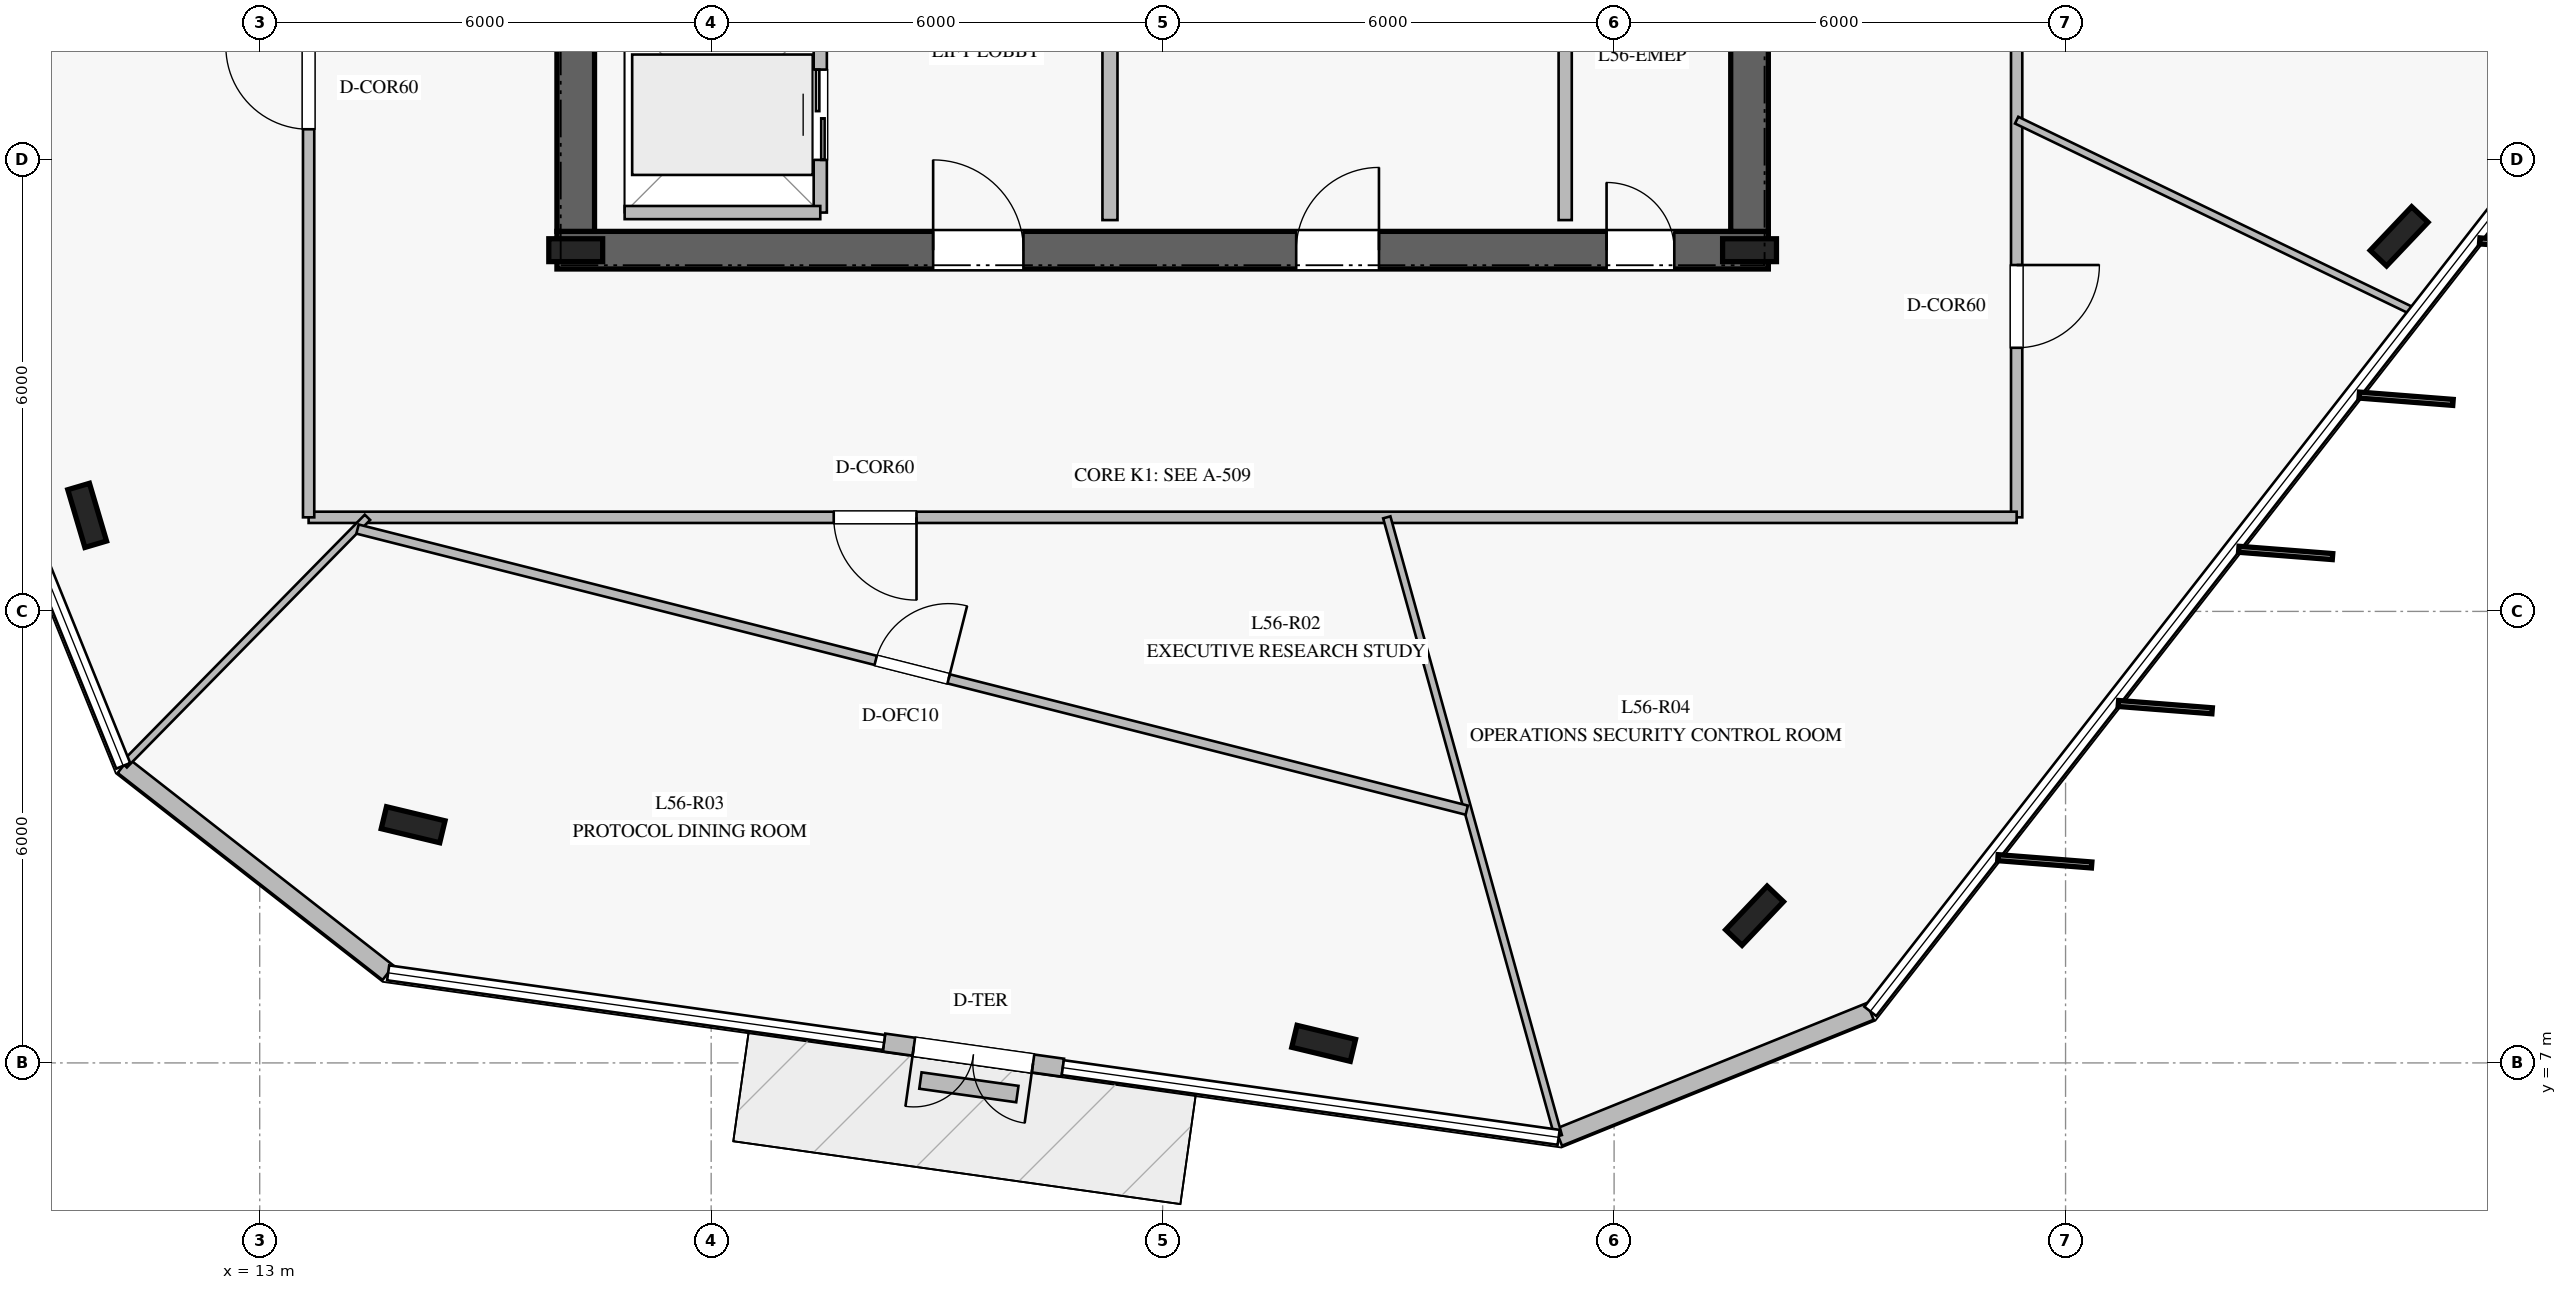
"""IFC4 building model, lengths in metres.
Left out: names, types, materials, properties, quantities, classifications, styles, units other than length and angle.
Written with IfcOpenShell. Run it as: python <this file> out.ifc"""

import sys

from ifc_helpers import new_model, si_unit, direction, frame, frame_2d, origin, origin_2d, place, context, subcontext, project, spatial, rectangle, i_section, extrude, element, fill, save


model = new_model("IFC4")
c1 = context("Model", 3, precision=1e-05, world=origin(), true_north=direction((0.0, 1.0)))
c2 = subcontext(c1, "Body", "Model", "MODEL_VIEW")
j1 = project(units=[si_unit("LENGTHUNIT", "METRE"), si_unit("PLANEANGLEUNIT", "RADIAN")], contexts=[c1])
p1 = place(None, origin())
s1 = spatial("IfcSite", under=j1, at=p1, CompositionType="ELEMENT")
p2 = place(p1, origin())
s2 = spatial("IfcBuilding", under=s1, at=p2, CompositionType="ELEMENT")
p3 = place(p2, frame((0.0, 0.0, 232.8)))
s3 = spatial("IfcBuildingStorey", under=s2, at=p3, CompositionType="ELEMENT", Elevation=232.8)
p4 = place(p3, frame((16.95, 17.8, 0.0), z_axis=(0.0, 0.0, 1.0), x_axis=(1.0, 0.0, 0.0)))
e1 = element("IfcWall", 1, at=p4, inside=s3, PredefinedType="SHEAR", context=c2, shape_type="SweptSolid", body=[
    extrude(rectangle(XDim=16.1, YDim=0.5, at=frame_2d((8.05, 0.0))), origin(), (0.0, 0.0, 1.0), 3.78),
])
p5 = place(p4, frame((5.0, 0.0, 0.0)))
e2 = element("IfcOpeningElement", 2, at=p5, cuts=e1, PredefinedType="OPENING", context=c2, shape_type="SweptSolid", body=[
    extrude(rectangle(XDim=1.2, YDim=2.25, at=frame_2d((0.6, 1.125))), frame((0.0, 0.26, 0.0), z_axis=(0.0, -1.0, 0.0), x_axis=(1.0, 0.0, 0.0)), (0.0, 0.0, 1.0), 0.52),
])
p6 = place(p4, frame((13.95, 0.0, 0.0)))
e3 = element("IfcOpeningElement", 3, at=p6, cuts=e1, PredefinedType="OPENING", context=c2, shape_type="SweptSolid", body=[
    extrude(rectangle(XDim=0.9, YDim=2.1, at=frame_2d((0.45, 1.05))), frame((0.0, 0.26, 0.0), z_axis=(0.0, -1.0, 0.0), x_axis=(1.0, 0.0, 0.0)), (0.0, 0.0, 1.0), 0.52),
])
p7 = place(p4, frame((9.825, 0.0, 0.0)))
e4 = element("IfcOpeningElement", 4, at=p7, cuts=e1, PredefinedType="OPENING", context=c2, shape_type="SweptSolid", body=[
    extrude(rectangle(XDim=1.1, YDim=2.2, at=frame_2d((0.55, 1.1))), frame((0.0, 0.26, 0.0), z_axis=(0.0, -1.0, 0.0), x_axis=(1.0, 0.0, 0.0)), (0.0, 0.0, 1.0), 0.52),
])
p8 = place(p3, frame((17.2, 31.95, 0.0), z_axis=(0.0, 0.0, 1.0), x_axis=(0.0, -1.0, 0.0)))
e5 = element("IfcWall", 5, at=p8, inside=s3, PredefinedType="SHEAR", context=c2, shape_type="SweptSolid", body=[
    extrude(rectangle(XDim=13.9, YDim=0.5, at=frame_2d((6.95, 0.0))), origin(), (0.0, 0.0, 1.0), 3.78),
])
p9 = place(p8, frame((2.1, 0.0, 0.0)))
e6 = element("IfcOpeningElement", 6, at=p9, cuts=e5, PredefinedType="OPENING", context=c2, shape_type="SweptSolid", body=[
    extrude(rectangle(XDim=1.5, YDim=2.2, at=frame_2d((0.75, 1.1))), frame((0.0, 0.26, 0.0), z_axis=(0.0, -1.0, 0.0), x_axis=(1.0, 0.0, 0.0)), (0.0, 0.0, 1.0), 0.52),
])
p10 = place(p3, frame((32.8, 18.05, 0.0), z_axis=(0.0, 0.0, 1.0), x_axis=(0.0, 1.0, 0.0)))
e7 = element("IfcWall", 7, at=p10, inside=s3, PredefinedType="SHEAR", context=c2, shape_type="SweptSolid", body=[
    extrude(rectangle(XDim=13.9, YDim=0.5, at=frame_2d((6.95, 0.0))), origin(), (0.0, 0.0, 1.0), 3.78),
])
for number, where, z_axis, x_axis in (
    (8, (17.2, 17.8, 0.0), (0.0, 0.0, 1.0), (1.0, 0.0, 0.0)),
    (9, (32.8, 17.8, 0.0), (0.0, 0.0, 1.0), (1.0, 0.0, 0.0)),
):
    element("IfcColumn", number, at=place(p3, frame(where, z_axis=z_axis, x_axis=x_axis)), inside=s3, PredefinedType="COLUMN", context=c2, shape_type="SweptSolid", body=[
        extrude(i_section(OverallWidth=0.304, OverallDepth=0.716, WebThickness=0.021, FlangeThickness=0.04, at=origin_2d()), origin(), (0.0, 0.0, 1.0), 4.0),
    ])
for number, where, z_axis, x_axis in (
    (10, (10.707, 14.276, 0.0), (0.0, 0.0, 1.0), (-0.284, 0.959, 0.0)),
    (11, (15.039, 10.165, 0.0), (0.0, 0.0, 1.0), (-0.972, 0.233, 0.0)),
    (12, (27.14, 7.26, 0.0), (0.0, 0.0, 1.0), (-0.972, 0.233, 0.0)),
    (13, (32.867, 8.956, 0.0), (0.0, 0.0, 1.0), (0.688, 0.725, 0.0)),
    (14, (41.433, 17.984, 0.0), (0.0, 0.0, 1.0), (0.688, 0.725, 0.0)),
):
    element("IfcColumn", number, at=place(p3, frame(where, z_axis=z_axis, x_axis=x_axis)), inside=s3, PredefinedType="COLUMN", context=c2, shape_type="SweptSolid", body=[
        extrude(i_section(OverallWidth=0.3, OverallDepth=0.8, WebThickness=0.018, FlangeThickness=0.033, at=origin_2d()), origin(), (0.0, 0.0, 1.0), 4.0),
    ])
p11 = place(p3, frame((11.186, 10.948, 0.0), z_axis=(0.0, 0.0, 1.0), x_axis=(0.788002835757, -0.615671609577, 0.0)))
e15 = element("IfcWall", 15, at=p11, inside=s3, PredefinedType="STANDARD", context=c2, shape_type="SweptSolid", body=[
    extrude(rectangle(XDim=4.468, YDim=0.24, at=frame_2d((2.234, 0.0))), origin(), (0.0, 0.0, 1.0), 3.78),
])
p12 = place(p3, frame((21.297, 7.271, 0.0), z_axis=(0.0, 0.0, 1.0), x_axis=(0.990264470021, -0.139198704787, 0.0)))
e16 = element("IfcWall", 16, at=p12, inside=s3, PredefinedType="STANDARD", context=c2, shape_type="SweptSolid", body=[
    extrude(rectangle(XDim=2.399, YDim=0.24, at=frame_2d((1.2, 0.0))), origin(), (0.0, 0.0, 1.0), 3.78),
])
p13 = place(p12, frame((0.4, 0.0, 0.0)))
e17 = element("IfcOpeningElement", 17, at=p13, cuts=e16, PredefinedType="OPENING", context=c2, shape_type="SweptSolid", body=[
    extrude(rectangle(XDim=1.6, YDim=2.25, at=frame_2d((0.8, 1.125))), frame((0.0, 0.13, 0.0), z_axis=(0.0, -1.0, 0.0), x_axis=(1.0, 0.0, 0.0)), (0.0, 0.0, 1.0), 0.26),
])
p14 = place(p3, frame((30.263, 6.011, 0.0), z_axis=(0.0, 0.0, 1.0), x_axis=(0.927140363033, 0.374714220754, 0.0)))
e18 = element("IfcWall", 18, at=p14, inside=s3, PredefinedType="STANDARD", context=c2, shape_type="SweptSolid", body=[
    extrude(rectangle(XDim=4.468, YDim=0.24, at=frame_2d((2.234, 0.0))), origin(), (0.0, 0.0, 1.0), 3.78),
])
p15 = place(p3, frame((21.781, 6.766, 0.0), z_axis=(0.0, 0.0, 1.0), x_axis=(0.990358235174, -0.138530018491, 0.0)))
e19 = element("IfcWall", 19, at=p15, inside=s3, PredefinedType="USERDEFINED", context=c2, shape_type="SweptSolid", body=[
    extrude(rectangle(XDim=1.301, YDim=0.22, at=frame_2d((0.65, 0.0))), origin(), (0.0, 0.0, 1.0), 0.4),
])
p16 = place(p3, frame((24.3, 18.2, 0.0), z_axis=(0.0, 0.0, 1.0), x_axis=(0.0, 1.0, 0.0)))
e20 = element("IfcWall", 20, at=p16, inside=s3, PredefinedType="PARTITIONING", context=c2, shape_type="SweptSolid", body=[
    extrude(rectangle(XDim=5.15, YDim=0.2, at=frame_2d((2.575, 0.0))), origin(), (0.0, 0.0, 1.0), 3.78),
])
p17 = place(p3, frame((30.35, 18.2, 0.0), z_axis=(0.0, 0.0, 1.0), x_axis=(0.0, 1.0, 0.0)))
e21 = element("IfcWall", 21, at=p17, inside=s3, PredefinedType="PARTITIONING", context=c2, shape_type="SweptSolid", body=[
    extrude(rectangle(XDim=3.48, YDim=0.175, at=frame_2d((1.74, 0.0))), origin(), (0.0, 0.0, 1.0), 3.78),
])
p18 = place(p3, frame((20.45, 18.3, 0.0), z_axis=(0.0, 0.0, 1.0), x_axis=(0.0, 1.0, 0.0)))
e22 = element("IfcWall", 22, at=p18, inside=s3, PredefinedType="PARTITIONING", context=c2, shape_type="SweptSolid", body=[
    extrude(rectangle(XDim=2.6, YDim=0.175, at=frame_2d((1.3, 0.0))), origin(), (0.0, 0.0, 1.0), 3.78),
])
p19 = place(p18, frame((0.7, 0.0, 0.0)))
e23 = element("IfcOpeningElement", 23, at=p19, cuts=e22, PredefinedType="OPENING", context=c2, shape_type="SweptSolid", body=[
    extrude(rectangle(XDim=1.2, YDim=2.2, at=frame_2d((0.6, 1.1))), frame((0.0, 0.098, 0.0), z_axis=(0.0, -1.0, 0.0), x_axis=(1.0, 0.0, 0.0)), (0.0, 0.0, 1.0), 0.195),
])
p20 = place(p3, frame((17.85, 18.3, 0.0), z_axis=(0.0, 0.0, 1.0), x_axis=(1.0, 0.0, 0.0)))
e24 = element("IfcWall", 24, at=p20, inside=s3, PredefinedType="PARTITIONING", context=c2, shape_type="SweptSolid", body=[
    extrude(rectangle(XDim=2.6, YDim=0.175, at=frame_2d((1.3, 0.0))), origin(), (0.0, 0.0, 1.0), 3.78),
])
p21 = place(p3, frame((36.35, 35.75, 0.0), z_axis=(0.0, 0.0, 1.0), x_axis=(0.0, -1.0, 0.0)))
e25 = element("IfcWall", 25, at=p21, inside=s3, PredefinedType="PARTITIONING", context=c2, shape_type="SweptSolid", body=[
    extrude(rectangle(XDim=21.5, YDim=0.15, at=frame_2d((10.75, 0.0))), origin(), (0.0, 0.0, 1.0), 3.05),
])
p22 = place(p21, frame((18.147, 0.0, 0.0)))
e26 = element("IfcOpeningElement", 26, at=p22, cuts=e25, PredefinedType="OPENING", context=c2, shape_type="SweptSolid", body=[
    extrude(rectangle(XDim=1.1, YDim=2.2, at=frame_2d((0.55, 1.1))), frame((0.0, 0.085, 0.0), z_axis=(0.0, -1.0, 0.0), x_axis=(1.0, 0.0, 0.0)), (0.0, 0.0, 1.0), 0.17),
])
p23 = place(p21, frame((9.62, 0.0, 0.0)))
e27 = element("IfcOpeningElement", 27, at=p23, cuts=e25, PredefinedType="OPENING", context=c2, shape_type="SweptSolid", body=[
    extrude(rectangle(XDim=1.1, YDim=2.2, at=frame_2d((0.55, 1.1))), frame((0.0, 0.085, 0.0), z_axis=(0.0, -1.0, 0.0), x_axis=(1.0, 0.0, 0.0)), (0.0, 0.0, 1.0), 0.17),
])
p24 = place(p3, frame((36.35, 14.25, 0.0), z_axis=(0.0, 0.0, 1.0), x_axis=(-1.0, 0.0, 0.0)))
e28 = element("IfcWall", 28, at=p24, inside=s3, PredefinedType="PARTITIONING", context=c2, shape_type="SweptSolid", body=[
    extrude(rectangle(XDim=22.7, YDim=0.15, at=frame_2d((11.35, 0.0))), origin(), (0.0, 0.0, 1.0), 3.05),
])
p25 = place(p24, frame((14.621, 0.0, 0.0)))
e29 = element("IfcOpeningElement", 29, at=p25, cuts=e28, PredefinedType="OPENING", context=c2, shape_type="SweptSolid", body=[
    extrude(rectangle(XDim=1.1, YDim=2.2, at=frame_2d((0.55, 1.1))), frame((0.0, 0.085, 0.0), z_axis=(0.0, -1.0, 0.0), x_axis=(1.0, 0.0, 0.0)), (0.0, 0.0, 1.0), 0.17),
])
p26 = place(p3, frame((13.65, 14.25, 0.0), z_axis=(0.0, 0.0, 1.0), x_axis=(0.0, 1.0, 0.0)))
e30 = element("IfcWall", 30, at=p26, inside=s3, PredefinedType="PARTITIONING", context=c2, shape_type="SweptSolid", body=[
    extrude(rectangle(XDim=21.5, YDim=0.15, at=frame_2d((10.75, 0.0))), origin(), (0.0, 0.0, 1.0), 3.05),
])
p27 = place(p26, frame((5.157, 0.0, 0.0)))
e31 = element("IfcOpeningElement", 31, at=p27, cuts=e30, PredefinedType="OPENING", context=c2, shape_type="SweptSolid", body=[
    extrude(rectangle(XDim=1.1, YDim=2.2, at=frame_2d((0.55, 1.1))), frame((0.0, 0.085, 0.0), z_axis=(0.0, -1.0, 0.0), x_axis=(1.0, 0.0, 0.0)), (0.0, 0.0, 1.0), 0.17),
])
p28 = place(p3, frame((14.432, 14.25, 0.0), z_axis=(0.0, 0.0, 1.0), x_axis=(-0.700992810531, -0.713168338882, 0.0)))
e32 = element("IfcWall", 32, at=p28, inside=s3, PredefinedType="MOVABLE", context=c2, shape_type="SweptSolid", body=[
    extrude(rectangle(XDim=4.612, YDim=0.1, at=frame_2d((2.306, 0.0))), origin(), (0.0, 0.0, 1.0), 3.18),
])
p29 = place(p3, frame((27.979, 14.25, 0.0), z_axis=(0.0, 0.0, 1.0), x_axis=(0.267119901351, -0.963663301316, 0.0)))
e33 = element("IfcWall", 33, at=p29, inside=s3, PredefinedType="MOVABLE", context=c2, shape_type="SweptSolid", body=[
    extrude(rectangle(XDim=8.532, YDim=0.1, at=frame_2d((4.266, 0.0))), origin(), (0.0, 0.0, 1.0), 3.18),
])
p30 = place(p3, frame((36.35, 19.528, 0.0), z_axis=(0.0, 0.0, 1.0), x_axis=(0.900766359383, -0.434304001597, 0.0)))
e34 = element("IfcWall", 34, at=p30, inside=s3, PredefinedType="MOVABLE", context=c2, shape_type="SweptSolid", body=[
    extrude(rectangle(XDim=5.876, YDim=0.1, at=frame_2d((2.938, 0.0))), origin(), (0.0, 0.0, 1.0), 3.18),
])
p31 = place(p3, frame((14.3, 14.094, 0.0), z_axis=(0.0, 0.0, 1.0), x_axis=(0.969369895499, -0.245605386139, 0.0)))
e35 = element("IfcWall", 35, at=p31, inside=s3, PredefinedType="PARTITIONING", context=c2, shape_type="SweptSolid", body=[
    extrude(rectangle(XDim=15.208, YDim=0.125, at=frame_2d((7.604, 0.0))), origin(), (0.0, 0.0, 1.0), 3.28),
])
p32 = place(p31, frame((7.104, 0.0, 0.0)))
e36 = element("IfcOpeningElement", 36, at=p32, cuts=e35, PredefinedType="OPENING", context=c2, shape_type="SweptSolid", body=[
    extrude(rectangle(XDim=1.0, YDim=2.15, at=frame_2d((0.5, 1.075))), frame((0.0, 0.073, 0.0), z_axis=(0.0, -1.0, 0.0), x_axis=(1.0, 0.0, 0.0)), (0.0, 0.0, 1.0), 0.145),
])
p33 = place(p13, frame((1.6, 0.0, 0.0), z_axis=(0.0, 0.0, 1.0), x_axis=(-1.0, 0.0, 0.0)))
e37 = element("IfcDoor", 37, at=p33, inside=s3, OperationType="DOUBLE_DOOR_SINGLE_SWING", PredefinedType="DOOR", context=c2, shape_type="SweptSolid", body=[
    extrude(rectangle(XDim=1.6, YDim=2.25, at=frame_2d((0.8, 1.125))), frame((0.0, 0.025, 0.0), z_axis=(0.0, -1.0, 0.0), x_axis=(1.0, 0.0, 0.0)), (0.0, 0.0, 1.0), 0.05),
])
fill(e17, e37)
p34 = place(p5, origin())
e38 = element("IfcDoor", 38, at=p34, inside=s3, OperationType="SINGLE_SWING_LEFT", PredefinedType="DOOR", context=c2, shape_type="SweptSolid", body=[
    extrude(rectangle(XDim=1.2, YDim=2.25, at=frame_2d((0.6, 1.125))), frame((0.0, 0.025, 0.0), z_axis=(0.0, -1.0, 0.0), x_axis=(1.0, 0.0, 0.0)), (0.0, 0.0, 1.0), 0.05),
])
fill(e2, e38)
p35 = place(p6, origin())
e39 = element("IfcDoor", 39, at=p35, inside=s3, OperationType="SINGLE_SWING_LEFT", PredefinedType="DOOR", context=c2, shape_type="SweptSolid", body=[
    extrude(rectangle(XDim=0.9, YDim=2.1, at=frame_2d((0.45, 1.05))), frame((0.0, 0.025, 0.0), z_axis=(0.0, -1.0, 0.0), x_axis=(1.0, 0.0, 0.0)), (0.0, 0.0, 1.0), 0.05),
])
fill(e3, e39)
p36 = place(p7, origin())
e40 = element("IfcDoor", 40, at=p36, inside=s3, OperationType="SINGLE_SWING_RIGHT", PredefinedType="DOOR", context=c2, shape_type="SweptSolid", body=[
    extrude(rectangle(XDim=1.1, YDim=2.2, at=frame_2d((0.55, 1.1))), frame((0.0, 0.025, 0.0), z_axis=(0.0, -1.0, 0.0), x_axis=(1.0, 0.0, 0.0)), (0.0, 0.0, 1.0), 0.05),
])
fill(e4, e40)
p37 = place(p19, origin())
e41 = element("IfcDoor", 41, at=p37, inside=s3, OperationType="DOUBLE_DOOR_SLIDING", PredefinedType="DOOR", context=c2, shape_type="SweptSolid", body=[
    extrude(rectangle(XDim=1.2, YDim=2.2, at=frame_2d((0.6, 1.1))), frame((0.0, 0.025, 0.0), z_axis=(0.0, -1.0, 0.0), x_axis=(1.0, 0.0, 0.0)), (0.0, 0.0, 1.0), 0.05),
])
fill(e23, e41)
p38 = place(p27, origin())
e42 = element("IfcDoor", 42, at=p38, inside=s3, OperationType="SINGLE_SWING_RIGHT", PredefinedType="DOOR", context=c2, shape_type="SweptSolid", body=[
    extrude(rectangle(XDim=1.1, YDim=2.2, at=frame_2d((0.55, 1.1))), frame((0.0, 0.025, 0.0), z_axis=(0.0, -1.0, 0.0), x_axis=(1.0, 0.0, 0.0)), (0.0, 0.0, 1.0), 0.05),
])
fill(e31, e42)
p39 = place(p25, origin())
e43 = element("IfcDoor", 43, at=p39, inside=s3, OperationType="SINGLE_SWING_LEFT", PredefinedType="DOOR", context=c2, shape_type="SweptSolid", body=[
    extrude(rectangle(XDim=1.1, YDim=2.2, at=frame_2d((0.55, 1.1))), frame((0.0, 0.025, 0.0), z_axis=(0.0, -1.0, 0.0), x_axis=(1.0, 0.0, 0.0)), (0.0, 0.0, 1.0), 0.05),
])
fill(e29, e43)
p40 = place(p32, origin())
e44 = element("IfcDoor", 44, at=p40, inside=s3, OperationType="SINGLE_SWING_RIGHT", PredefinedType="DOOR", context=c2, shape_type="SweptSolid", body=[
    extrude(rectangle(XDim=1.0, YDim=2.15, at=frame_2d((0.5, 1.075))), frame((0.0, 0.025, 0.0), z_axis=(0.0, -1.0, 0.0), x_axis=(1.0, 0.0, 0.0)), (0.0, 0.0, 1.0), 0.05),
])
fill(e36, e44)
p41 = place(p22, origin())
e45 = element("IfcDoor", 45, at=p41, inside=s3, OperationType="SINGLE_SWING_LEFT", PredefinedType="DOOR", context=c2, shape_type="SweptSolid", body=[
    extrude(rectangle(XDim=1.1, YDim=2.2, at=frame_2d((0.55, 1.1))), frame((0.0, 0.025, 0.0), z_axis=(0.0, -1.0, 0.0), x_axis=(1.0, 0.0, 0.0)), (0.0, 0.0, 1.0), 0.05),
])
fill(e26, e45)
save(model, sys.argv[1])
